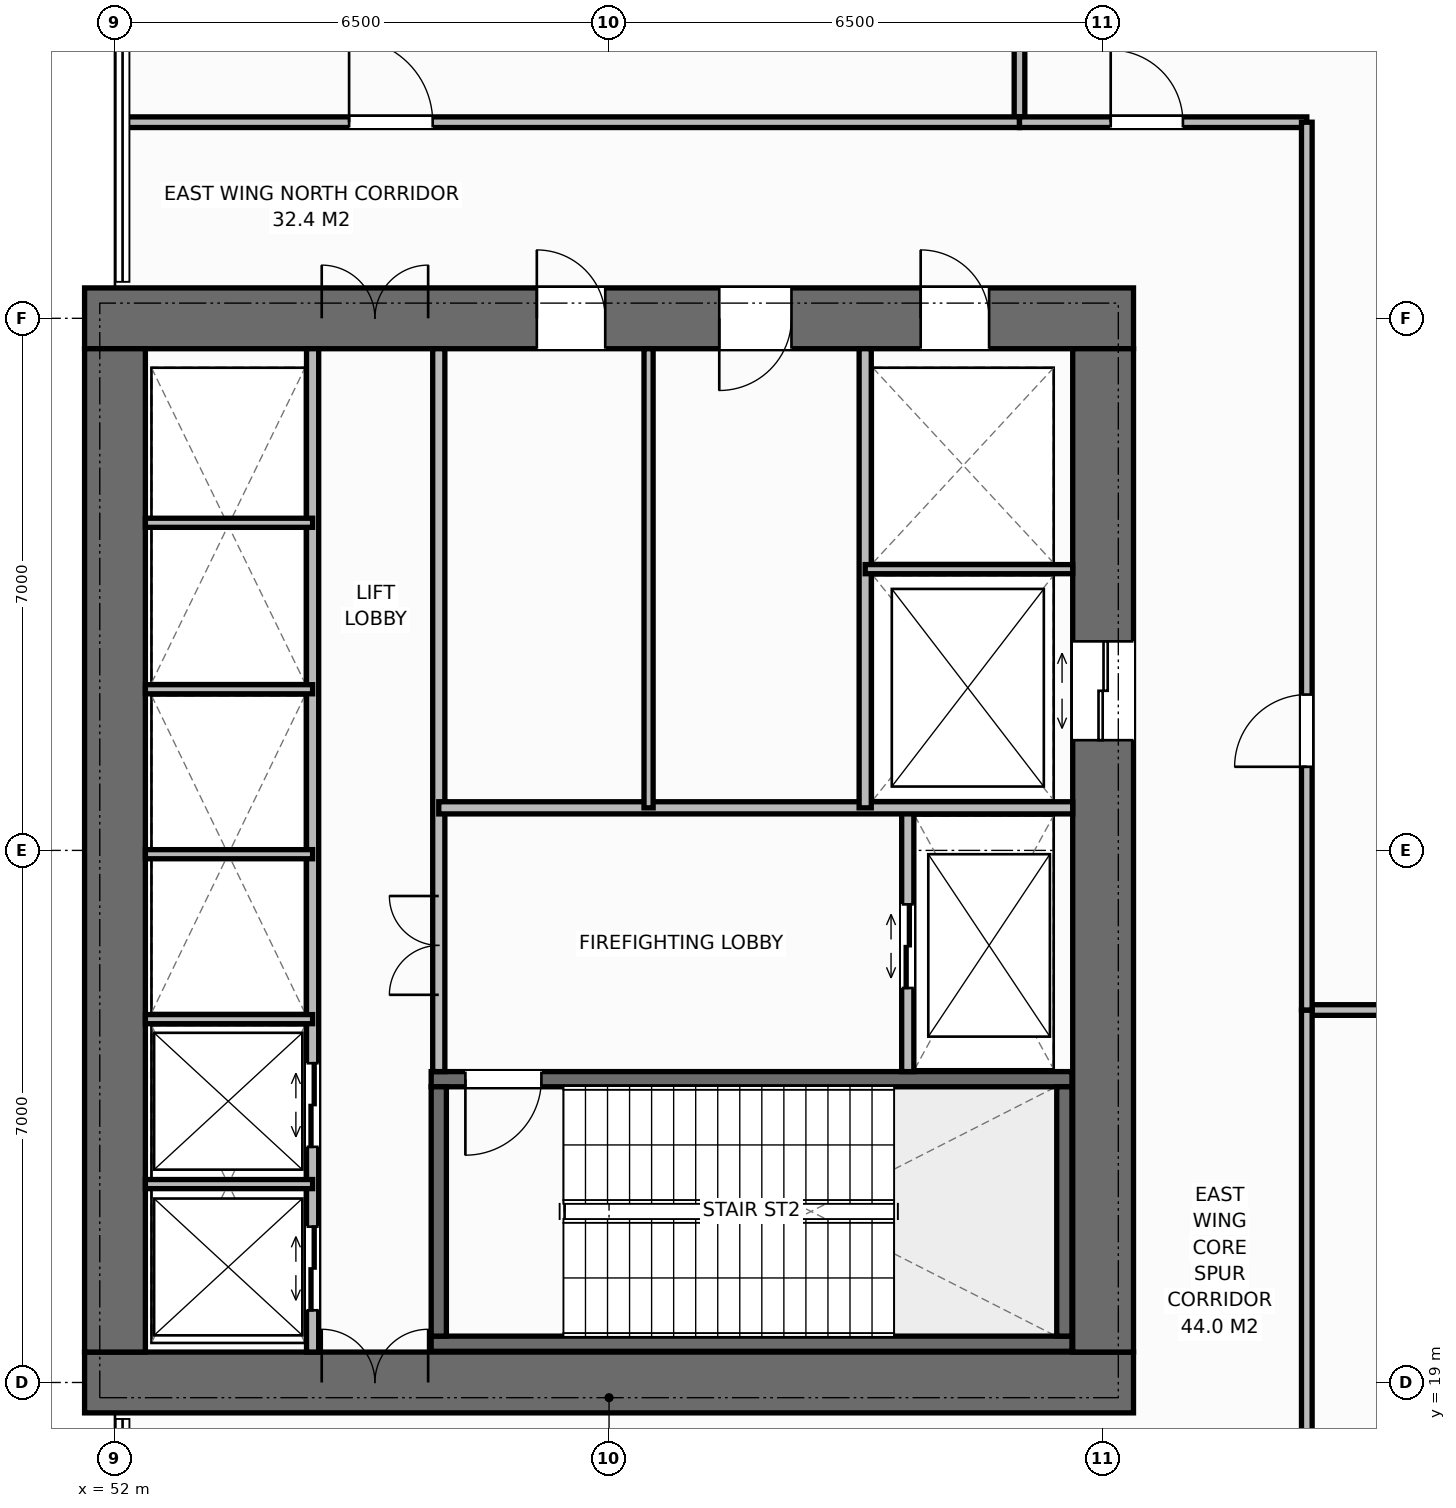
"""IFC4 building model, lengths in metres.
Left out: names, types, materials, properties, quantities, classifications, styles, units other than length and angle.
Written with IfcOpenShell. Run it as: python <this file> out.ifc"""

import sys

from ifc_helpers import new_model, si_unit, direction, frame, frame_2d, origin, place, context, subcontext, project, spatial, rectangle, extrude, element, fill, save


model = new_model("IFC4")
c1 = context("Model", 3, precision=1e-05, world=origin(), true_north=direction((0.0, 1.0)))
c2 = subcontext(c1, "Body", "Model", "MODEL_VIEW")
j1 = project(units=[si_unit("LENGTHUNIT", "METRE"), si_unit("PLANEANGLEUNIT", "RADIAN")], contexts=[c1])
p1 = place(None, origin())
s1 = spatial("IfcSite", under=j1, at=p1, CompositionType="ELEMENT")
p2 = place(p1, origin())
s2 = spatial("IfcBuilding", under=s1, at=p2, CompositionType="ELEMENT")
p3 = place(p2, frame((0.0, 0.0, 6.0)))
s3 = spatial("IfcBuildingStorey", under=s2, at=p3, CompositionType="ELEMENT", Elevation=6.0)
p4 = place(p3, frame((51.6, 19.0, 0.0), z_axis=(0.0, 0.0, 1.0), x_axis=(1.0, 0.0, 0.0)))
e1 = element("IfcWall", 1, at=p4, inside=s3, PredefinedType="SHEAR", context=c2, shape_type="SweptSolid", body=[
    extrude(rectangle(XDim=13.8, YDim=0.8, at=frame_2d((6.9, 0.0))), origin(), (0.0, 0.0, 1.0), 5.5),
])
p5 = place(p4, frame((3.12, 0.0, 0.0)))
e2 = element("IfcOpeningElement", 2, at=p5, cuts=e1, PredefinedType="OPENING", context=c2, shape_type="SweptSolid", body=[
    extrude(rectangle(XDim=1.4, YDim=2.2, at=frame_2d((0.7, 1.1))), frame((0.0, 0.41, 0.0), z_axis=(0.0, -1.0, 0.0), x_axis=(1.0, 0.0, 0.0)), (0.0, 0.0, 1.0), 0.82),
])
p6 = place(p3, frame((51.6, 33.0, 0.0), z_axis=(0.0, 0.0, 1.0), x_axis=(1.0, 0.0, 0.0)))
e3 = element("IfcWall", 3, at=p6, inside=s3, PredefinedType="SHEAR", context=c2, shape_type="SweptSolid", body=[
    extrude(rectangle(XDim=13.8, YDim=0.8, at=frame_2d((6.9, 0.0))), origin(), (0.0, 0.0, 1.0), 5.5),
])
p7 = place(p6, frame((3.12, 0.0, 0.0)))
e4 = element("IfcOpeningElement", 4, at=p7, cuts=e3, PredefinedType="OPENING", context=c2, shape_type="SweptSolid", body=[
    extrude(rectangle(XDim=1.4, YDim=2.2, at=frame_2d((0.7, 1.1))), frame((0.0, 0.41, 0.0), z_axis=(0.0, -1.0, 0.0), x_axis=(1.0, 0.0, 0.0)), (0.0, 0.0, 1.0), 0.82),
])
p8 = place(p6, frame((11.0, 0.0, 0.0)))
e5 = element("IfcOpeningElement", 5, at=p8, cuts=e3, PredefinedType="OPENING", context=c2, shape_type="SweptSolid", body=[
    extrude(rectangle(XDim=0.9, YDim=2.15, at=frame_2d((0.45, 1.075))), frame((0.0, 0.41, 0.0), z_axis=(0.0, -1.0, 0.0), x_axis=(1.0, 0.0, 0.0)), (0.0, 0.0, 1.0), 0.82),
])
p9 = place(p6, frame((5.95, 0.0, 0.0)))
e6 = element("IfcOpeningElement", 6, at=p9, cuts=e3, PredefinedType="OPENING", context=c2, shape_type="SweptSolid", body=[
    extrude(rectangle(XDim=0.9, YDim=2.15, at=frame_2d((0.45, 1.075))), frame((0.0, 0.41, 0.0), z_axis=(0.0, -1.0, 0.0), x_axis=(1.0, 0.0, 0.0)), (0.0, 0.0, 1.0), 0.82),
])
p10 = place(p6, frame((8.35, 0.0, 0.0)))
e7 = element("IfcOpeningElement", 7, at=p10, cuts=e3, PredefinedType="OPENING", context=c2, shape_type="SweptSolid", body=[
    extrude(rectangle(XDim=0.95, YDim=2.15, at=frame_2d((0.475, 1.075))), frame((0.0, 0.41, 0.0), z_axis=(0.0, -1.0, 0.0), x_axis=(1.0, 0.0, 0.0)), (0.0, 0.0, 1.0), 0.82),
])
p11 = place(p3, frame((52.0, 19.4, 0.0), z_axis=(0.0, 0.0, 1.0), x_axis=(0.0, 1.0, 0.0)))
e8 = element("IfcWall", 8, at=p11, inside=s3, PredefinedType="SHEAR", context=c2, shape_type="SweptSolid", body=[
    extrude(rectangle(XDim=13.2, YDim=0.8, at=frame_2d((6.6, 0.0))), origin(), (0.0, 0.0, 1.0), 5.5),
])
p12 = place(p3, frame((65.0, 19.4, 0.0), z_axis=(0.0, 0.0, 1.0), x_axis=(0.0, 1.0, 0.0)))
e9 = element("IfcWall", 9, at=p12, inside=s3, PredefinedType="SHEAR", context=c2, shape_type="SweptSolid", body=[
    extrude(rectangle(XDim=13.2, YDim=0.8, at=frame_2d((6.6, 0.0))), origin(), (0.0, 0.0, 1.0), 5.5),
])
p13 = place(p12, frame((8.05, 0.0, 0.0)))
e10 = element("IfcOpeningElement", 10, at=p13, cuts=e9, PredefinedType="OPENING", context=c2, shape_type="SweptSolid", body=[
    extrude(rectangle(XDim=1.3, YDim=2.2, at=frame_2d((0.65, 1.1))), frame((0.0, 0.41, 0.0), z_axis=(0.0, -1.0, 0.0), x_axis=(1.0, 0.0, 0.0)), (0.0, 0.0, 1.0), 0.82),
])
p14 = place(p3, frame((56.16, 19.51, 0.0), z_axis=(0.0, 0.0, 1.0), x_axis=(1.0, 0.0, 0.0)))
e11 = element("IfcWall", 11, at=p14, inside=s3, PredefinedType="SHEAR", context=c2, shape_type="SweptSolid", body=[
    extrude(rectangle(XDim=8.43, YDim=0.2, at=frame_2d((4.215, 0.0))), origin(), (0.0, 0.0, 1.0), 5.5),
])
p15 = place(p3, frame((56.16, 22.99, 0.0), z_axis=(0.0, 0.0, 1.0), x_axis=(1.0, 0.0, 0.0)))
e12 = element("IfcWall", 12, at=p15, inside=s3, PredefinedType="SHEAR", context=c2, shape_type="SweptSolid", body=[
    extrude(rectangle(XDim=8.43, YDim=0.2, at=frame_2d((4.215, 0.0))), origin(), (0.0, 0.0, 1.0), 5.5),
])
p16 = place(p15, frame((0.45, 0.0, 0.0)))
e13 = element("IfcOpeningElement", 13, at=p16, cuts=e12, PredefinedType="OPENING", context=c2, shape_type="SweptSolid", body=[
    extrude(rectangle(XDim=1.0, YDim=2.15, at=frame_2d((0.5, 1.075))), frame((0.0, 0.11, 0.0), z_axis=(0.0, -1.0, 0.0), x_axis=(1.0, 0.0, 0.0)), (0.0, 0.0, 1.0), 0.22),
])
for number, where, z_axis, x_axis in (
    (14, (56.26, 19.61, 0.0), (0.0, 0.0, 1.0), (0.0, 1.0, 0.0)),
    (15, (64.49, 19.61, 0.0), (0.0, 0.0, 1.0), (0.0, 1.0, 0.0)),
):
    element("IfcWall", number, at=place(p3, frame(where, z_axis=z_axis, x_axis=x_axis)), inside=s3, PredefinedType="SHEAR", context=c2, shape_type="SweptSolid", body=[
        extrude(rectangle(XDim=3.28, YDim=0.2, at=frame_2d((1.64, 0.0))), origin(), (0.0, 0.0, 1.0), 5.5),
    ])
p17 = place(p3, frame((54.6, 19.4, 0.0), z_axis=(0.0, 0.0, 1.0), x_axis=(0.0, 1.0, 0.0)))
e16 = element("IfcWall", 16, at=p17, inside=s3, PredefinedType="STANDARD", context=c2, shape_type="SweptSolid", body=[
    extrude(rectangle(XDim=13.2, YDim=0.16, at=frame_2d((6.6, 0.0))), origin(), (0.0, 0.0, 1.0), 5.22),
])
p18 = place(p17, frame((0.55, 0.0, 0.0)))
e17 = element("IfcOpeningElement", 17, at=p18, cuts=e16, PredefinedType="OPENING", context=c2, shape_type="SweptSolid", body=[
    extrude(rectangle(XDim=1.1, YDim=2.2, at=frame_2d((0.55, 1.1))), frame((0.0, 0.09, 0.0), z_axis=(0.0, -1.0, 0.0), x_axis=(1.0, 0.0, 0.0)), (0.0, 0.0, 1.0), 0.18),
])
p19 = place(p17, frame((2.7, 0.0, 0.0)))
e18 = element("IfcOpeningElement", 18, at=p19, cuts=e16, PredefinedType="OPENING", context=c2, shape_type="SweptSolid", body=[
    extrude(rectangle(XDim=1.1, YDim=2.2, at=frame_2d((0.55, 1.1))), frame((0.0, 0.09, 0.0), z_axis=(0.0, -1.0, 0.0), x_axis=(1.0, 0.0, 0.0)), (0.0, 0.0, 1.0), 0.18),
])
p20 = place(p3, frame((56.26, 23.09, 0.0), z_axis=(0.0, 0.0, 1.0), x_axis=(0.0, 1.0, 0.0)))
e19 = element("IfcWall", 19, at=p20, inside=s3, PredefinedType="STANDARD", context=c2, shape_type="SweptSolid", body=[
    extrude(rectangle(XDim=9.51, YDim=0.16, at=frame_2d((4.755, 0.0))), origin(), (0.0, 0.0, 1.0), 5.22),
])
p21 = place(p20, frame((1.01, 0.0, 0.0)))
e20 = element("IfcOpeningElement", 20, at=p21, cuts=e19, PredefinedType="OPENING", context=c2, shape_type="SweptSolid", body=[
    extrude(rectangle(XDim=1.3, YDim=2.2, at=frame_2d((0.65, 1.1))), frame((0.0, 0.09, 0.0), z_axis=(0.0, -1.0, 0.0), x_axis=(1.0, 0.0, 0.0)), (0.0, 0.0, 1.0), 0.18),
])
for number, where, z_axis, x_axis in (
    (21, (52.4, 21.61, 0.0), (0.0, 0.0, 1.0), (1.0, 0.0, 0.0)),
    (22, (52.4, 23.78, 0.0), (0.0, 0.0, 1.0), (1.0, 0.0, 0.0)),
    (23, (52.4, 25.95, 0.0), (0.0, 0.0, 1.0), (1.0, 0.0, 0.0)),
    (24, (52.4, 28.12, 0.0), (0.0, 0.0, 1.0), (1.0, 0.0, 0.0)),
    (25, (52.4, 30.31, 0.0), (0.0, 0.0, 1.0), (1.0, 0.0, 0.0)),
):
    element("IfcWall", number, at=place(p3, frame(where, z_axis=z_axis, x_axis=x_axis)), inside=s3, PredefinedType="PARTITIONING", context=c2, shape_type="SweptSolid", body=[
        extrude(rectangle(XDim=2.2, YDim=0.12, at=frame_2d((1.1, 0.0))), origin(), (0.0, 0.0, 1.0), 5.22),
    ])
p22 = place(p3, frame((62.43, 23.09, 0.0), z_axis=(0.0, 0.0, 1.0), x_axis=(0.0, 1.0, 0.0)))
e26 = element("IfcWall", 26, at=p22, inside=s3, PredefinedType="STANDARD", context=c2, shape_type="SweptSolid", body=[
    extrude(rectangle(XDim=3.47, YDim=0.16, at=frame_2d((1.735, 0.0))), origin(), (0.0, 0.0, 1.0), 5.22),
])
p23 = place(p22, frame((1.1, 0.0, 0.0)))
e27 = element("IfcOpeningElement", 27, at=p23, cuts=e26, PredefinedType="OPENING", context=c2, shape_type="SweptSolid", body=[
    extrude(rectangle(XDim=1.1, YDim=2.2, at=frame_2d((0.55, 1.1))), frame((0.0, 0.09, 0.0), z_axis=(0.0, -1.0, 0.0), x_axis=(1.0, 0.0, 0.0)), (0.0, 0.0, 1.0), 0.18),
])
p24 = place(p3, frame((56.26, 26.56, 0.0), z_axis=(0.0, 0.0, 1.0), x_axis=(1.0, 0.0, 0.0)))
e28 = element("IfcWall", 28, at=p24, inside=s3, PredefinedType="STANDARD", context=c2, shape_type="SweptSolid", body=[
    extrude(rectangle(XDim=8.34, YDim=0.16, at=frame_2d((4.17, 0.0))), origin(), (0.0, 0.0, 1.0), 5.22),
])
p25 = place(p3, frame((61.87, 26.56, 0.0), z_axis=(0.0, 0.0, 1.0), x_axis=(0.0, 1.0, 0.0)))
e29 = element("IfcWall", 29, at=p25, inside=s3, PredefinedType="STANDARD", context=c2, shape_type="SweptSolid", body=[
    extrude(rectangle(XDim=6.04, YDim=0.16, at=frame_2d((3.02, 0.0))), origin(), (0.0, 0.0, 1.0), 5.22),
])
p26 = place(p3, frame((61.87, 29.7, 0.0), z_axis=(0.0, 0.0, 1.0), x_axis=(1.0, 0.0, 0.0)))
e30 = element("IfcWall", 30, at=p26, inside=s3, PredefinedType="PARTITIONING", context=c2, shape_type="SweptSolid", body=[
    extrude(rectangle(XDim=2.73, YDim=0.12, at=frame_2d((1.365, 0.0))), origin(), (0.0, 0.0, 1.0), 5.22),
])
p27 = place(p3, frame((59.02, 26.56, 0.0), z_axis=(0.0, 0.0, 1.0), x_axis=(0.0, 1.0, 0.0)))
e31 = element("IfcWall", 31, at=p27, inside=s3, PredefinedType="PARTITIONING", context=c2, shape_type="SweptSolid", body=[
    extrude(rectangle(XDim=6.04, YDim=0.12, at=frame_2d((3.02, 0.0))), origin(), (0.0, 0.0, 1.0), 5.22),
])
p28 = place(p3, frame((63.9, 35.58, 0.0), z_axis=(0.0, 0.0, 1.0), x_axis=(0.0, 1.0, 0.0)))
e32 = element("IfcWall", 32, at=p28, inside=s3, PredefinedType="PARTITIONING", context=c2, shape_type="SweptSolid", body=[
    extrude(rectangle(XDim=16.36, YDim=0.14, at=frame_2d((8.18, 0.0))), origin(), (0.0, 0.0, 1.0), 5.22),
])
p29 = place(p3, frame((67.68, 23.9, 0.0), z_axis=(0.0, 0.0, 1.0), x_axis=(1.0, 0.0, 0.0)))
e33 = element("IfcWall", 33, at=p29, inside=s3, PredefinedType="PARTITIONING", context=c2, shape_type="SweptSolid", body=[
    extrude(rectangle(XDim=10.32, YDim=0.14, at=frame_2d((5.16, 0.0))), origin(), (0.0, 0.0, 1.0), 5.22),
])
p30 = place(p3, frame((52.08, 35.58, 0.0), z_axis=(0.0, 0.0, 1.0), x_axis=(1.0, 0.0, 0.0)))
e34 = element("IfcWall", 34, at=p30, inside=s3, PredefinedType="PARTITIONING", context=c2, shape_type="SweptSolid", body=[
    extrude(rectangle(XDim=11.82, YDim=0.14, at=frame_2d((5.91, 0.0))), origin(), (0.0, 0.0, 1.0), 5.22),
])
p31 = place(p30, frame((3.0, 0.0, 0.0)))
e35 = element("IfcOpeningElement", 35, at=p31, cuts=e34, PredefinedType="OPENING", context=c2, shape_type="SweptSolid", body=[
    extrude(rectangle(XDim=1.1, YDim=2.15, at=frame_2d((0.55, 1.075))), frame((0.0, 0.08, 0.0), z_axis=(0.0, -1.0, 0.0), x_axis=(1.0, 0.0, 0.0)), (0.0, 0.0, 1.0), 0.16),
])
p32 = place(p3, frame((63.9, 35.58, 0.0), z_axis=(0.0, 0.0, 1.0), x_axis=(1.0, 0.0, 0.0)))
e36 = element("IfcWall", 36, at=p32, inside=s3, PredefinedType="PARTITIONING", context=c2, shape_type="SweptSolid", body=[
    extrude(rectangle(XDim=3.78, YDim=0.14, at=frame_2d((1.89, 0.0))), origin(), (0.0, 0.0, 1.0), 5.22),
])
p33 = place(p32, frame((1.2, 0.0, 0.0)))
e37 = element("IfcOpeningElement", 37, at=p33, cuts=e36, PredefinedType="OPENING", context=c2, shape_type="SweptSolid", body=[
    extrude(rectangle(XDim=0.95, YDim=2.15, at=frame_2d((0.475, 1.075))), frame((0.0, 0.08, 0.0), z_axis=(0.0, -1.0, 0.0), x_axis=(1.0, 0.0, 0.0)), (0.0, 0.0, 1.0), 0.16),
])
p34 = place(p3, frame((67.68, 12.45, 0.0), z_axis=(0.0, 0.0, 1.0), x_axis=(0.0, 1.0, 0.0)))
e38 = element("IfcWall", 38, at=p34, inside=s3, PredefinedType="PARTITIONING", context=c2, shape_type="SweptSolid", body=[
    extrude(rectangle(XDim=11.45, YDim=0.14, at=frame_2d((5.725, 0.0))), origin(), (0.0, 0.0, 1.0), 5.22),
])
p35 = place(p34, frame((3.2, 0.0, 0.0)))
e39 = element("IfcOpeningElement", 39, at=p35, cuts=e38, PredefinedType="OPENING", context=c2, shape_type="SweptSolid", body=[
    extrude(rectangle(XDim=1.1, YDim=2.15, at=frame_2d((0.55, 1.075))), frame((0.0, 0.08, 0.0), z_axis=(0.0, -1.0, 0.0), x_axis=(1.0, 0.0, 0.0)), (0.0, 0.0, 1.0), 0.16),
])
p36 = place(p3, frame((67.68, 23.9, 0.0), z_axis=(0.0, 0.0, 1.0), x_axis=(0.0, 1.0, 0.0)))
e40 = element("IfcWall", 40, at=p36, inside=s3, PredefinedType="PARTITIONING", context=c2, shape_type="SweptSolid", body=[
    extrude(rectangle(XDim=11.68, YDim=0.14, at=frame_2d((5.84, 0.0))), origin(), (0.0, 0.0, 1.0), 5.22),
])
p37 = place(p36, frame((3.2, 0.0, 0.0)))
e41 = element("IfcOpeningElement", 41, at=p37, cuts=e40, PredefinedType="OPENING", context=c2, shape_type="SweptSolid", body=[
    extrude(rectangle(XDim=0.95, YDim=2.15, at=frame_2d((0.475, 1.075))), frame((0.0, 0.08, 0.0), z_axis=(0.0, -1.0, 0.0), x_axis=(1.0, 0.0, 0.0)), (0.0, 0.0, 1.0), 0.16),
])
p38 = place(p5, origin())
e42 = element("IfcDoor", 42, at=p38, inside=s3, OperationType="DOUBLE_DOOR_SINGLE_SWING", PredefinedType="DOOR", context=c2, shape_type="SweptSolid", body=[
    extrude(rectangle(XDim=1.4, YDim=2.2, at=frame_2d((0.7, 1.1))), frame((0.0, 0.125, 0.0), z_axis=(0.0, -1.0, 0.0), x_axis=(1.0, 0.0, 0.0)), (0.0, 0.0, 1.0), 0.05),
])
fill(e2, e42)
p39 = place(p7, origin())
e43 = element("IfcDoor", 43, at=p39, inside=s3, OperationType="DOUBLE_DOOR_SINGLE_SWING", PredefinedType="DOOR", context=c2, shape_type="SweptSolid", body=[
    extrude(rectangle(XDim=1.4, YDim=2.2, at=frame_2d((0.7, 1.1))), frame((0.0, -0.075, 0.0), z_axis=(0.0, -1.0, 0.0), x_axis=(1.0, 0.0, 0.0)), (0.0, 0.0, 1.0), 0.05),
])
fill(e4, e43)
p40 = place(p18, origin())
e44 = element("IfcDoor", 44, at=p40, inside=s3, OperationType="DOUBLE_DOOR_SLIDING", PredefinedType="DOOR", context=c2, shape_type="SweptSolid", body=[
    extrude(rectangle(XDim=1.1, YDim=2.2, at=frame_2d((0.55, 1.1))), frame((0.0, 0.025, 0.0), z_axis=(0.0, -1.0, 0.0), x_axis=(1.0, 0.0, 0.0)), (0.0, 0.0, 1.0), 0.05),
])
fill(e17, e44)
p41 = place(p19, origin())
e45 = element("IfcDoor", 45, at=p41, inside=s3, OperationType="DOUBLE_DOOR_SLIDING", PredefinedType="DOOR", context=c2, shape_type="SweptSolid", body=[
    extrude(rectangle(XDim=1.1, YDim=2.2, at=frame_2d((0.55, 1.1))), frame((0.0, 0.025, 0.0), z_axis=(0.0, -1.0, 0.0), x_axis=(1.0, 0.0, 0.0)), (0.0, 0.0, 1.0), 0.05),
])
fill(e18, e45)
p42 = place(p16, origin())
e46 = element("IfcDoor", 46, at=p42, inside=s3, OperationType="SINGLE_SWING_RIGHT", PredefinedType="DOOR", context=c2, shape_type="SweptSolid", body=[
    extrude(rectangle(XDim=1.0, YDim=2.15, at=frame_2d((0.5, 1.075))), frame((0.0, 0.025, 0.0), z_axis=(0.0, -1.0, 0.0), x_axis=(1.0, 0.0, 0.0)), (0.0, 0.0, 1.0), 0.05),
])
fill(e13, e46)
p43 = place(p23, origin())
e47 = element("IfcDoor", 47, at=p43, inside=s3, OperationType="DOUBLE_DOOR_SLIDING", PredefinedType="DOOR", context=c2, shape_type="SweptSolid", body=[
    extrude(rectangle(XDim=1.1, YDim=2.2, at=frame_2d((0.55, 1.1))), frame((0.0, 0.025, 0.0), z_axis=(0.0, -1.0, 0.0), x_axis=(1.0, 0.0, 0.0)), (0.0, 0.0, 1.0), 0.05),
])
fill(e27, e47)
p44 = place(p21, origin())
e48 = element("IfcDoor", 48, at=p44, inside=s3, OperationType="DOUBLE_DOOR_SINGLE_SWING", PredefinedType="DOOR", context=c2, shape_type="SweptSolid", body=[
    extrude(rectangle(XDim=1.3, YDim=2.2, at=frame_2d((0.65, 1.1))), frame((0.0, 0.025, 0.0), z_axis=(0.0, -1.0, 0.0), x_axis=(1.0, 0.0, 0.0)), (0.0, 0.0, 1.0), 0.05),
])
fill(e20, e48)
p45 = place(p13, origin())
e49 = element("IfcDoor", 49, at=p45, inside=s3, OperationType="DOUBLE_DOOR_SLIDING", PredefinedType="DOOR", context=c2, shape_type="SweptSolid", body=[
    extrude(rectangle(XDim=1.3, YDim=2.2, at=frame_2d((0.65, 1.1))), frame((0.0, 0.025, 0.0), z_axis=(0.0, -1.0, 0.0), x_axis=(1.0, 0.0, 0.0)), (0.0, 0.0, 1.0), 0.05),
])
fill(e10, e49)
p46 = place(p8, origin())
e50 = element("IfcDoor", 50, at=p46, inside=s3, OperationType="SINGLE_SWING_LEFT", PredefinedType="DOOR", context=c2, shape_type="SweptSolid", body=[
    extrude(rectangle(XDim=0.9, YDim=2.15, at=frame_2d((0.45, 1.075))), frame((0.0, -0.075, 0.0), z_axis=(0.0, -1.0, 0.0), x_axis=(1.0, 0.0, 0.0)), (0.0, 0.0, 1.0), 0.05),
])
fill(e5, e50)
p47 = place(p9, origin())
e51 = element("IfcDoor", 51, at=p47, inside=s3, OperationType="SINGLE_SWING_LEFT", PredefinedType="DOOR", context=c2, shape_type="SweptSolid", body=[
    extrude(rectangle(XDim=0.9, YDim=2.15, at=frame_2d((0.45, 1.075))), frame((0.0, -0.075, 0.0), z_axis=(0.0, -1.0, 0.0), x_axis=(1.0, 0.0, 0.0)), (0.0, 0.0, 1.0), 0.05),
])
fill(e6, e51)
p48 = place(p10, origin())
e52 = element("IfcDoor", 52, at=p48, inside=s3, OperationType="SINGLE_SWING_RIGHT", PredefinedType="DOOR", context=c2, shape_type="SweptSolid", body=[
    extrude(rectangle(XDim=0.95, YDim=2.15, at=frame_2d((0.475, 1.075))), frame((0.0, -0.075, 0.0), z_axis=(0.0, -1.0, 0.0), x_axis=(1.0, 0.0, 0.0)), (0.0, 0.0, 1.0), 0.05),
])
fill(e7, e52)
p49 = place(p31, origin())
e53 = element("IfcDoor", 53, at=p49, inside=s3, OperationType="SINGLE_SWING_LEFT", PredefinedType="DOOR", context=c2, shape_type="SweptSolid", body=[
    extrude(rectangle(XDim=1.1, YDim=2.15, at=frame_2d((0.55, 1.075))), frame((0.0, 0.025, 0.0), z_axis=(0.0, -1.0, 0.0), x_axis=(1.0, 0.0, 0.0)), (0.0, 0.0, 1.0), 0.05),
])
fill(e35, e53)
p50 = place(p33, origin())
e54 = element("IfcDoor", 54, at=p50, inside=s3, OperationType="SINGLE_SWING_LEFT", PredefinedType="DOOR", context=c2, shape_type="SweptSolid", body=[
    extrude(rectangle(XDim=0.95, YDim=2.15, at=frame_2d((0.475, 1.075))), frame((0.0, 0.025, 0.0), z_axis=(0.0, -1.0, 0.0), x_axis=(1.0, 0.0, 0.0)), (0.0, 0.0, 1.0), 0.05),
])
fill(e37, e54)
p51 = place(p37, origin())
e55 = element("IfcDoor", 55, at=p51, inside=s3, OperationType="SINGLE_SWING_LEFT", PredefinedType="DOOR", context=c2, shape_type="SweptSolid", body=[
    extrude(rectangle(XDim=0.95, YDim=2.15, at=frame_2d((0.475, 1.075))), frame((0.0, 0.025, 0.0), z_axis=(0.0, -1.0, 0.0), x_axis=(1.0, 0.0, 0.0)), (0.0, 0.0, 1.0), 0.05),
])
fill(e41, e55)
save(model, sys.argv[1])
